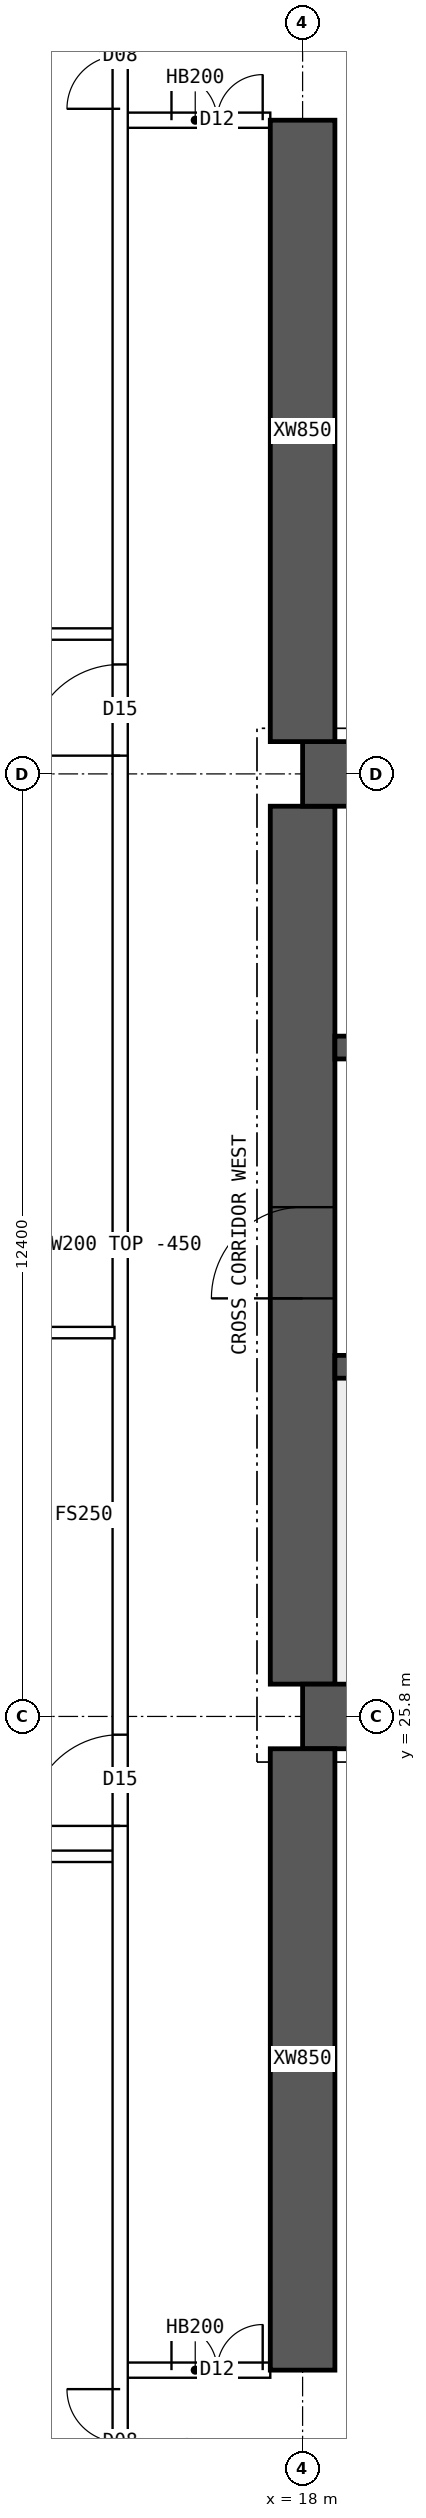
"""IFC4 building model, lengths in metres.
Left out: names, types, materials, properties, quantities, classifications, styles, units other than length and angle.
Written with IfcOpenShell. Run it as: python <this file> out.ifc"""

import sys

from ifc_helpers import new_model, si_unit, direction, frame, frame_2d, origin, place, context, subcontext, project, spatial, polyline, rectangle, outline, extrude, element, fill, save


model = new_model("IFC4")
c1 = context("Model", 3, precision=1e-05, world=origin(), true_north=direction((0.0, 1.0)))
c2 = subcontext(c1, "Body", "Model", "MODEL_VIEW")
j1 = project(units=[si_unit("LENGTHUNIT", "METRE"), si_unit("PLANEANGLEUNIT", "RADIAN")], contexts=[c1])
p1 = place(None, origin())
s1 = spatial("IfcSite", under=j1, at=p1, CompositionType="ELEMENT")
p2 = place(p1, origin())
s2 = spatial("IfcBuilding", under=s1, at=p2, CompositionType="ELEMENT")
p3 = place(p2, frame((0.0, 0.0, 159.85)))
s3 = spatial("IfcBuildingStorey", under=s2, at=p3, CompositionType="ELEMENT", Elevation=159.85)
for number, where, z_axis, x_axis in (
    (1, (18.0, 25.8, 0.0), (0.0, 0.0, 1.0), (1.0, 0.0, 0.0)),
    (2, (18.0, 38.2, 0.0), (0.0, 0.0, 1.0), (1.0, 0.0, 0.0)),
):
    element("IfcWall", number, at=place(p3, frame(where, z_axis=z_axis, x_axis=x_axis)), inside=s3, PredefinedType="SHEAR", context=c2, shape_type="SweptSolid", body=[
        extrude(rectangle(XDim=48.0, YDim=0.85, at=frame_2d((24.0, 0.0))), origin(), (0.0, 0.0, 1.0), 3.75),
    ])
p4 = place(p3, frame((18.0, 26.225, 0.0), z_axis=(0.0, 0.0, 1.0), x_axis=(0.0, 1.0, 0.0)))
e3 = element("IfcWall", 3, at=p4, inside=s3, PredefinedType="SHEAR", context=c2, shape_type="SweptSolid", body=[
    extrude(rectangle(XDim=11.55, YDim=0.85, at=frame_2d((5.775, 0.0))), origin(), (0.0, 0.0, 1.0), 3.75),
])
p5 = place(p4, frame((5.075, 0.0, 0.0)))
e4 = element("IfcOpeningElement", 4, at=p5, cuts=e3, PredefinedType="OPENING", context=c2, shape_type="SweptSolid", body=[
    extrude(rectangle(XDim=1.2, YDim=2.1, at=frame_2d((0.6, 1.05))), frame((0.0, 0.435, 0.0), z_axis=(0.0, -1.0, 0.0), x_axis=(1.0, 0.0, 0.0)), (0.0, 0.0, 1.0), 0.87),
])
p6 = place(p3, frame((18.425, 30.4, 0.0), z_axis=(0.0, 0.0, 1.0), x_axis=(1.0, 0.0, 0.0)))
e5 = element("IfcWall", 5, at=p6, inside=s3, PredefinedType="SHEAR", context=c2, shape_type="SweptSolid", body=[
    extrude(rectangle(XDim=47.15, YDim=0.3, at=frame_2d((23.575, 0.0))), origin(), (0.0, 0.0, 1.0), 3.75),
])
p7 = place(p6, frame((0.4, 0.0, 0.0)))
e6 = element("IfcOpeningElement", 6, at=p7, cuts=e5, PredefinedType="OPENING", context=c2, shape_type="SweptSolid", body=[
    extrude(rectangle(XDim=1.0, YDim=2.1, at=frame_2d((0.5, 1.05))), frame((0.0, 0.16, 0.0), z_axis=(0.0, -1.0, 0.0), x_axis=(1.0, 0.0, 0.0)), (0.0, 0.0, 1.0), 0.32),
])
p8 = place(p6, frame((45.75, 0.0, 0.0)))
e7 = element("IfcOpeningElement", 7, at=p8, cuts=e5, PredefinedType="OPENING", context=c2, shape_type="SweptSolid", body=[
    extrude(rectangle(XDim=1.0, YDim=2.1, at=frame_2d((0.5, 1.05))), frame((0.0, 0.16, 0.0), z_axis=(0.0, -1.0, 0.0), x_axis=(1.0, 0.0, 0.0)), (0.0, 0.0, 1.0), 0.32),
])
p9 = place(p6, frame((8.325, 0.0, 0.0)))
e8 = element("IfcOpeningElement", 8, at=p9, cuts=e5, PredefinedType="OPENING", context=c2, shape_type="SweptSolid", body=[
    extrude(rectangle(XDim=1.1, YDim=2.1, at=frame_2d((0.55, 1.05))), frame((0.0, 0.16, 0.0), z_axis=(0.0, -1.0, 0.0), x_axis=(1.0, 0.0, 0.0)), (0.0, 0.0, 1.0), 0.32),
])
p10 = place(p6, frame((10.925, 0.0, 0.0)))
e9 = element("IfcOpeningElement", 9, at=p10, cuts=e5, PredefinedType="OPENING", context=c2, shape_type="SweptSolid", body=[
    extrude(rectangle(XDim=1.1, YDim=2.1, at=frame_2d((0.55, 1.05))), frame((0.0, 0.16, 0.0), z_axis=(0.0, -1.0, 0.0), x_axis=(1.0, 0.0, 0.0)), (0.0, 0.0, 1.0), 0.32),
])
p11 = place(p6, frame((13.525, 0.0, 0.0)))
e10 = element("IfcOpeningElement", 10, at=p11, cuts=e5, PredefinedType="OPENING", context=c2, shape_type="SweptSolid", body=[
    extrude(rectangle(XDim=1.1, YDim=2.1, at=frame_2d((0.55, 1.05))), frame((0.0, 0.16, 0.0), z_axis=(0.0, -1.0, 0.0), x_axis=(1.0, 0.0, 0.0)), (0.0, 0.0, 1.0), 0.32),
])
p12 = place(p6, frame((16.125, 0.0, 0.0)))
e11 = element("IfcOpeningElement", 11, at=p12, cuts=e5, PredefinedType="OPENING", context=c2, shape_type="SweptSolid", body=[
    extrude(rectangle(XDim=1.1, YDim=2.1, at=frame_2d((0.55, 1.05))), frame((0.0, 0.16, 0.0), z_axis=(0.0, -1.0, 0.0), x_axis=(1.0, 0.0, 0.0)), (0.0, 0.0, 1.0), 0.32),
])
p13 = place(p6, frame((18.9, 0.0, 0.0)))
e12 = element("IfcOpeningElement", 12, at=p13, cuts=e5, PredefinedType="OPENING", context=c2, shape_type="SweptSolid", body=[
    extrude(rectangle(XDim=0.9, YDim=2.1, at=frame_2d((0.45, 1.05))), frame((0.0, 0.16, 0.0), z_axis=(0.0, -1.0, 0.0), x_axis=(1.0, 0.0, 0.0)), (0.0, 0.0, 1.0), 0.32),
])
p14 = place(p6, frame((30.192, 0.0, 0.0)))
e13 = element("IfcOpeningElement", 13, at=p14, cuts=e5, PredefinedType="OPENING", context=c2, shape_type="SweptSolid", body=[
    extrude(rectangle(XDim=1.1, YDim=2.1, at=frame_2d((0.55, 1.05))), frame((0.0, 0.16, 0.0), z_axis=(0.0, -1.0, 0.0), x_axis=(1.0, 0.0, 0.0)), (0.0, 0.0, 1.0), 0.32),
])
p15 = place(p6, frame((33.725, 0.0, 0.0)))
e14 = element("IfcOpeningElement", 14, at=p15, cuts=e5, PredefinedType="OPENING", context=c2, shape_type="SweptSolid", body=[
    extrude(rectangle(XDim=1.1, YDim=2.1, at=frame_2d((0.55, 1.05))), frame((0.0, 0.16, 0.0), z_axis=(0.0, -1.0, 0.0), x_axis=(1.0, 0.0, 0.0)), (0.0, 0.0, 1.0), 0.32),
])
p16 = place(p6, frame((37.258, 0.0, 0.0)))
e15 = element("IfcOpeningElement", 15, at=p16, cuts=e5, PredefinedType="OPENING", context=c2, shape_type="SweptSolid", body=[
    extrude(rectangle(XDim=1.1, YDim=2.1, at=frame_2d((0.55, 1.05))), frame((0.0, 0.16, 0.0), z_axis=(0.0, -1.0, 0.0), x_axis=(1.0, 0.0, 0.0)), (0.0, 0.0, 1.0), 0.32),
])
p17 = place(p3, frame((18.425, 34.6, 0.0), z_axis=(0.0, 0.0, 1.0), x_axis=(1.0, 0.0, 0.0)))
e16 = element("IfcWall", 16, at=p17, inside=s3, PredefinedType="SHEAR", context=c2, shape_type="SweptSolid", body=[
    extrude(rectangle(XDim=47.15, YDim=0.3, at=frame_2d((23.575, 0.0))), origin(), (0.0, 0.0, 1.0), 3.75),
])
p18 = place(p17, frame((0.9, 0.0, 0.0)))
e17 = element("IfcOpeningElement", 17, at=p18, cuts=e16, PredefinedType="OPENING", context=c2, shape_type="SweptSolid", body=[
    extrude(rectangle(XDim=1.1, YDim=2.1, at=frame_2d((0.55, 1.05))), frame((0.0, 0.16, 0.0), z_axis=(0.0, -1.0, 0.0), x_axis=(1.0, 0.0, 0.0)), (0.0, 0.0, 1.0), 0.32),
])
p19 = place(p17, frame((45.15, 0.0, 0.0)))
e18 = element("IfcOpeningElement", 18, at=p19, cuts=e16, PredefinedType="OPENING", context=c2, shape_type="SweptSolid", body=[
    extrude(rectangle(XDim=1.1, YDim=2.1, at=frame_2d((0.55, 1.05))), frame((0.0, 0.16, 0.0), z_axis=(0.0, -1.0, 0.0), x_axis=(1.0, 0.0, 0.0)), (0.0, 0.0, 1.0), 0.32),
])
p20 = place(p17, frame((4.175, 0.0, 0.0)))
e19 = element("IfcOpeningElement", 19, at=p20, cuts=e16, PredefinedType="OPENING", context=c2, shape_type="SweptSolid", body=[
    extrude(rectangle(XDim=0.9, YDim=2.1, at=frame_2d((0.45, 1.05))), frame((0.0, 0.16, 0.0), z_axis=(0.0, -1.0, 0.0), x_axis=(1.0, 0.0, 0.0)), (0.0, 0.0, 1.0), 0.32),
])
p21 = place(p17, frame((42.075, 0.0, 0.0)))
e20 = element("IfcOpeningElement", 20, at=p21, cuts=e16, PredefinedType="OPENING", context=c2, shape_type="SweptSolid", body=[
    extrude(rectangle(XDim=0.9, YDim=2.1, at=frame_2d((0.45, 1.05))), frame((0.0, 0.16, 0.0), z_axis=(0.0, -1.0, 0.0), x_axis=(1.0, 0.0, 0.0)), (0.0, 0.0, 1.0), 0.32),
])
p22 = place(p17, frame((8.95, 0.0, 0.0)))
e21 = element("IfcOpeningElement", 21, at=p22, cuts=e16, PredefinedType="OPENING", context=c2, shape_type="SweptSolid", body=[
    extrude(rectangle(XDim=0.9, YDim=2.1, at=frame_2d((0.45, 1.05))), frame((0.0, 0.16, 0.0), z_axis=(0.0, -1.0, 0.0), x_axis=(1.0, 0.0, 0.0)), (0.0, 0.0, 1.0), 0.32),
])
p23 = place(p17, frame((12.924, 0.0, 0.0)))
e22 = element("IfcOpeningElement", 22, at=p23, cuts=e16, PredefinedType="OPENING", context=c2, shape_type="SweptSolid", body=[
    extrude(rectangle(XDim=0.9, YDim=2.1, at=frame_2d((0.45, 1.05))), frame((0.0, 0.16, 0.0), z_axis=(0.0, -1.0, 0.0), x_axis=(1.0, 0.0, 0.0)), (0.0, 0.0, 1.0), 0.32),
])
p24 = place(p17, frame((16.571, 0.0, 0.0)))
e23 = element("IfcOpeningElement", 23, at=p24, cuts=e16, PredefinedType="OPENING", context=c2, shape_type="SweptSolid", body=[
    extrude(rectangle(XDim=0.9, YDim=2.1, at=frame_2d((0.45, 1.05))), frame((0.0, 0.16, 0.0), z_axis=(0.0, -1.0, 0.0), x_axis=(1.0, 0.0, 0.0)), (0.0, 0.0, 1.0), 0.32),
])
p25 = place(p17, frame((20.33, 0.0, 0.0)))
e24 = element("IfcOpeningElement", 24, at=p25, cuts=e16, PredefinedType="OPENING", context=c2, shape_type="SweptSolid", body=[
    extrude(rectangle(XDim=0.9, YDim=2.1, at=frame_2d((0.45, 1.05))), frame((0.0, 0.16, 0.0), z_axis=(0.0, -1.0, 0.0), x_axis=(1.0, 0.0, 0.0)), (0.0, 0.0, 1.0), 0.32),
])
p26 = place(p17, frame((24.736, 0.0, 0.0)))
e25 = element("IfcOpeningElement", 25, at=p26, cuts=e16, PredefinedType="OPENING", context=c2, shape_type="SweptSolid", body=[
    extrude(rectangle(XDim=0.9, YDim=2.1, at=frame_2d((0.45, 1.05))), frame((0.0, 0.16, 0.0), z_axis=(0.0, -1.0, 0.0), x_axis=(1.0, 0.0, 0.0)), (0.0, 0.0, 1.0), 0.32),
])
p27 = place(p17, frame((27.533, 0.0, 0.0)))
e26 = element("IfcOpeningElement", 26, at=p27, cuts=e16, PredefinedType="OPENING", context=c2, shape_type="SweptSolid", body=[
    extrude(rectangle(XDim=0.9, YDim=2.1, at=frame_2d((0.45, 1.05))), frame((0.0, 0.16, 0.0), z_axis=(0.0, -1.0, 0.0), x_axis=(1.0, 0.0, 0.0)), (0.0, 0.0, 1.0), 0.32),
])
p28 = place(p17, frame((29.906, 0.0, 0.0)))
e27 = element("IfcOpeningElement", 27, at=p28, cuts=e16, PredefinedType="OPENING", context=c2, shape_type="SweptSolid", body=[
    extrude(rectangle(XDim=0.9, YDim=2.1, at=frame_2d((0.45, 1.05))), frame((0.0, 0.16, 0.0), z_axis=(0.0, -1.0, 0.0), x_axis=(1.0, 0.0, 0.0)), (0.0, 0.0, 1.0), 0.32),
])
p29 = place(p17, frame((35.376, 0.0, 0.0)))
e28 = element("IfcOpeningElement", 28, at=p29, cuts=e16, PredefinedType="OPENING", context=c2, shape_type="SweptSolid", body=[
    extrude(rectangle(XDim=0.9, YDim=2.1, at=frame_2d((0.45, 1.05))), frame((0.0, 0.16, 0.0), z_axis=(0.0, -1.0, 0.0), x_axis=(1.0, 0.0, 0.0)), (0.0, 0.0, 1.0), 0.32),
])
for number, where, z_axis, x_axis in (
    (29, (18.0, 17.2, 0.0), (0.0, 0.0, 1.0), (0.0, 1.0, 0.0)),
    (30, (18.0, 38.625, 0.0), (0.0, 0.0, 1.0), (0.0, 1.0, 0.0)),
):
    element("IfcWall", number, at=place(p3, frame(where, z_axis=z_axis, x_axis=x_axis)), inside=s3, PredefinedType="SHEAR", context=c2, shape_type="SweptSolid", body=[
        extrude(rectangle(XDim=8.175, YDim=0.85, at=frame_2d((4.087, 0.0))), origin(), (0.0, 0.0, 1.0), 3.75),
    ])
p30 = place(p3, frame((15.6, 17.2, 0.0), z_axis=(0.0, 0.0, 1.0), x_axis=(1.0, 0.0, 0.0)))
e31 = element("IfcWall", 31, at=p30, inside=s3, PredefinedType="SOLIDWALL", context=c2, shape_type="SweptSolid", body=[
    extrude(rectangle(XDim=1.975, YDim=0.2, at=frame_2d((0.987, 0.0))), origin(), (0.0, 0.0, 1.0), 3.3),
])
p31 = place(p30, frame((0.675, 0.0, 0.0)))
e32 = element("IfcOpeningElement", 32, at=p31, cuts=e31, PredefinedType="OPENING", context=c2, shape_type="SweptSolid", body=[
    extrude(rectangle(XDim=1.2, YDim=2.1, at=frame_2d((0.6, 1.05))), frame((0.0, 0.11, 0.0), z_axis=(0.0, -1.0, 0.0), x_axis=(1.0, 0.0, 0.0)), (0.0, 0.0, 1.0), 0.22),
])
p32 = place(p3, frame((15.6, 46.8, 0.0), z_axis=(0.0, 0.0, 1.0), x_axis=(1.0, 0.0, 0.0)))
e33 = element("IfcWall", 33, at=p32, inside=s3, PredefinedType="SOLIDWALL", context=c2, shape_type="SweptSolid", body=[
    extrude(rectangle(XDim=1.975, YDim=0.2, at=frame_2d((0.987, 0.0))), origin(), (0.0, 0.0, 1.0), 3.3),
])
p33 = place(p32, frame((0.675, 0.0, 0.0)))
e34 = element("IfcOpeningElement", 34, at=p33, cuts=e33, PredefinedType="OPENING", context=c2, shape_type="SweptSolid", body=[
    extrude(rectangle(XDim=1.2, YDim=2.1, at=frame_2d((0.6, 1.05))), frame((0.0, 0.11, 0.0), z_axis=(0.0, -1.0, 0.0), x_axis=(1.0, 0.0, 0.0)), (0.0, 0.0, 1.0), 0.22),
])
p34 = place(p3, frame((8.705, 30.85, 0.0), z_axis=(0.0, 0.0, 1.0), x_axis=(1.0, 0.0, 0.0)))
e35 = element("IfcWall", 35, at=p34, inside=s3, PredefinedType="PARTITIONING", context=c2, shape_type="SweptSolid", body=[
    extrude(outline(polyline([(0.0, 0.0), (6.82, 0.0), (6.82, 3.3), (3.597, 3.3), (3.595, 2.85), (2.997, 2.85), (2.995, 3.3), (0.0, 3.3), (0.0, 0.0)])), frame((0.0, 0.075, 0.0), z_axis=(0.0, -1.0, 0.0), x_axis=(1.0, 0.0, 0.0)), (0.0, 0.0, 1.0), 0.15),
])
p35 = place(p3, frame((15.6, 10.446, 0.0), z_axis=(0.0, 0.0, 1.0), x_axis=(0.0, 1.0, 0.0)))
e36 = element("IfcWall", 36, at=p35, inside=s3, PredefinedType="SOLIDWALL", context=c2, shape_type="SweptSolid", body=[
    extrude(rectangle(XDim=43.107, YDim=0.2, at=frame_2d((21.554, 0.0))), origin(), (0.0, 0.0, 1.0), 3.3),
])
p36 = place(p35, frame((13.914, 0.0, 0.0)))
e37 = element("IfcOpeningElement", 37, at=p36, cuts=e36, PredefinedType="OPENING", context=c2, shape_type="SweptSolid", body=[
    extrude(rectangle(XDim=1.2, YDim=2.1, at=frame_2d((0.6, 1.05))), frame((0.0, 0.11, 0.0), z_axis=(0.0, -1.0, 0.0), x_axis=(1.0, 0.0, 0.0)), (0.0, 0.0, 1.0), 0.22),
])
p37 = place(p35, frame((27.994, 0.0, 0.0)))
e38 = element("IfcOpeningElement", 38, at=p37, cuts=e36, PredefinedType="OPENING", context=c2, shape_type="SweptSolid", body=[
    extrude(rectangle(XDim=1.2, YDim=2.1, at=frame_2d((0.6, 1.05))), frame((0.0, 0.11, 0.0), z_axis=(0.0, -1.0, 0.0), x_axis=(1.0, 0.0, 0.0)), (0.0, 0.0, 1.0), 0.22),
])
p38 = place(p35, frame((5.104, 0.0, 0.0)))
e39 = element("IfcOpeningElement", 39, at=p38, cuts=e36, PredefinedType="OPENING", context=c2, shape_type="SweptSolid", body=[
    extrude(rectangle(XDim=1.4, YDim=2.1, at=frame_2d((0.7, 1.05))), frame((0.0, 0.11, 0.0), z_axis=(0.0, -1.0, 0.0), x_axis=(1.0, 0.0, 0.0)), (0.0, 0.0, 1.0), 0.22),
])
p39 = place(p35, frame((36.504, 0.0, 0.0)))
e40 = element("IfcOpeningElement", 40, at=p39, cuts=e36, PredefinedType="OPENING", context=c2, shape_type="SweptSolid", body=[
    extrude(rectangle(XDim=1.4, YDim=2.1, at=frame_2d((0.7, 1.05))), frame((0.0, 0.11, 0.0), z_axis=(0.0, -1.0, 0.0), x_axis=(1.0, 0.0, 0.0)), (0.0, 0.0, 1.0), 0.22),
])
for number, where, z_axis, x_axis in (
    (41, (8.705, 23.96, 0.0), (0.0, 0.0, 1.0), (1.0, 0.0, 0.0)),
    (42, (8.705, 40.04, 0.0), (0.0, 0.0, 1.0), (1.0, 0.0, 0.0)),
):
    element("IfcWall", number, at=place(p3, frame(where, z_axis=z_axis, x_axis=x_axis)), inside=s3, PredefinedType="PARTITIONING", context=c2, shape_type="SweptSolid", body=[
        extrude(rectangle(XDim=6.82, YDim=0.15, at=frame_2d((3.41, 0.0))), origin(), (0.0, 0.0, 1.0), 3.3),
    ])
p40 = place(p5, origin())
e43 = element("IfcDoor", 43, at=p40, inside=s3, OperationType="SINGLE_SWING_LEFT", PredefinedType="DOOR", context=c2, shape_type="SweptSolid", body=[
    extrude(rectangle(XDim=1.2, YDim=2.1, at=frame_2d((0.6, 1.05))), frame((0.0, 0.025, 0.0), z_axis=(0.0, -1.0, 0.0), x_axis=(1.0, 0.0, 0.0)), (0.0, 0.0, 1.0), 0.05),
])
fill(e4, e43)
p41 = place(p31, origin())
e44 = element("IfcDoor", 44, at=p41, inside=s3, OperationType="DOUBLE_DOOR_SINGLE_SWING", PredefinedType="DOOR", context=c2, shape_type="SweptSolid", body=[
    extrude(rectangle(XDim=1.2, YDim=2.1, at=frame_2d((0.6, 1.05))), frame((0.0, 0.025, 0.0), z_axis=(0.0, -1.0, 0.0), x_axis=(1.0, 0.0, 0.0)), (0.0, 0.0, 1.0), 0.05),
])
fill(e32, e44)
p42 = place(p33, origin())
e45 = element("IfcDoor", 45, at=p42, inside=s3, OperationType="DOUBLE_DOOR_SINGLE_SWING", PredefinedType="DOOR", context=c2, shape_type="SweptSolid", body=[
    extrude(rectangle(XDim=1.2, YDim=2.1, at=frame_2d((0.6, 1.05))), frame((0.0, 0.025, 0.0), z_axis=(0.0, -1.0, 0.0), x_axis=(1.0, 0.0, 0.0)), (0.0, 0.0, 1.0), 0.05),
])
fill(e34, e45)
p43 = place(p36, origin())
e46 = element("IfcDoor", 46, at=p43, inside=s3, OperationType="SINGLE_SWING_LEFT", PredefinedType="DOOR", context=c2, shape_type="SweptSolid", body=[
    extrude(rectangle(XDim=1.2, YDim=2.1, at=frame_2d((0.6, 1.05))), frame((0.0, 0.025, 0.0), z_axis=(0.0, -1.0, 0.0), x_axis=(1.0, 0.0, 0.0)), (0.0, 0.0, 1.0), 0.05),
])
fill(e37, e46)
p44 = place(p37, origin())
e47 = element("IfcDoor", 47, at=p44, inside=s3, OperationType="SINGLE_SWING_LEFT", PredefinedType="DOOR", context=c2, shape_type="SweptSolid", body=[
    extrude(rectangle(XDim=1.2, YDim=2.1, at=frame_2d((0.6, 1.05))), frame((0.0, 0.025, 0.0), z_axis=(0.0, -1.0, 0.0), x_axis=(1.0, 0.0, 0.0)), (0.0, 0.0, 1.0), 0.05),
])
fill(e38, e47)
p45 = place(p38, origin())
e48 = element("IfcDoor", 48, at=p45, inside=s3, OperationType="DOUBLE_DOOR_SINGLE_SWING", PredefinedType="DOOR", context=c2, shape_type="SweptSolid", body=[
    extrude(rectangle(XDim=1.4, YDim=2.1, at=frame_2d((0.7, 1.05))), frame((0.0, 0.025, 0.0), z_axis=(0.0, -1.0, 0.0), x_axis=(1.0, 0.0, 0.0)), (0.0, 0.0, 1.0), 0.05),
])
fill(e39, e48)
p46 = place(p39, origin())
e49 = element("IfcDoor", 49, at=p46, inside=s3, OperationType="DOUBLE_DOOR_SINGLE_SWING", PredefinedType="DOOR", context=c2, shape_type="SweptSolid", body=[
    extrude(rectangle(XDim=1.4, YDim=2.1, at=frame_2d((0.7, 1.05))), frame((0.0, 0.025, 0.0), z_axis=(0.0, -1.0, 0.0), x_axis=(1.0, 0.0, 0.0)), (0.0, 0.0, 1.0), 0.05),
])
fill(e40, e49)
save(model, sys.argv[1])
